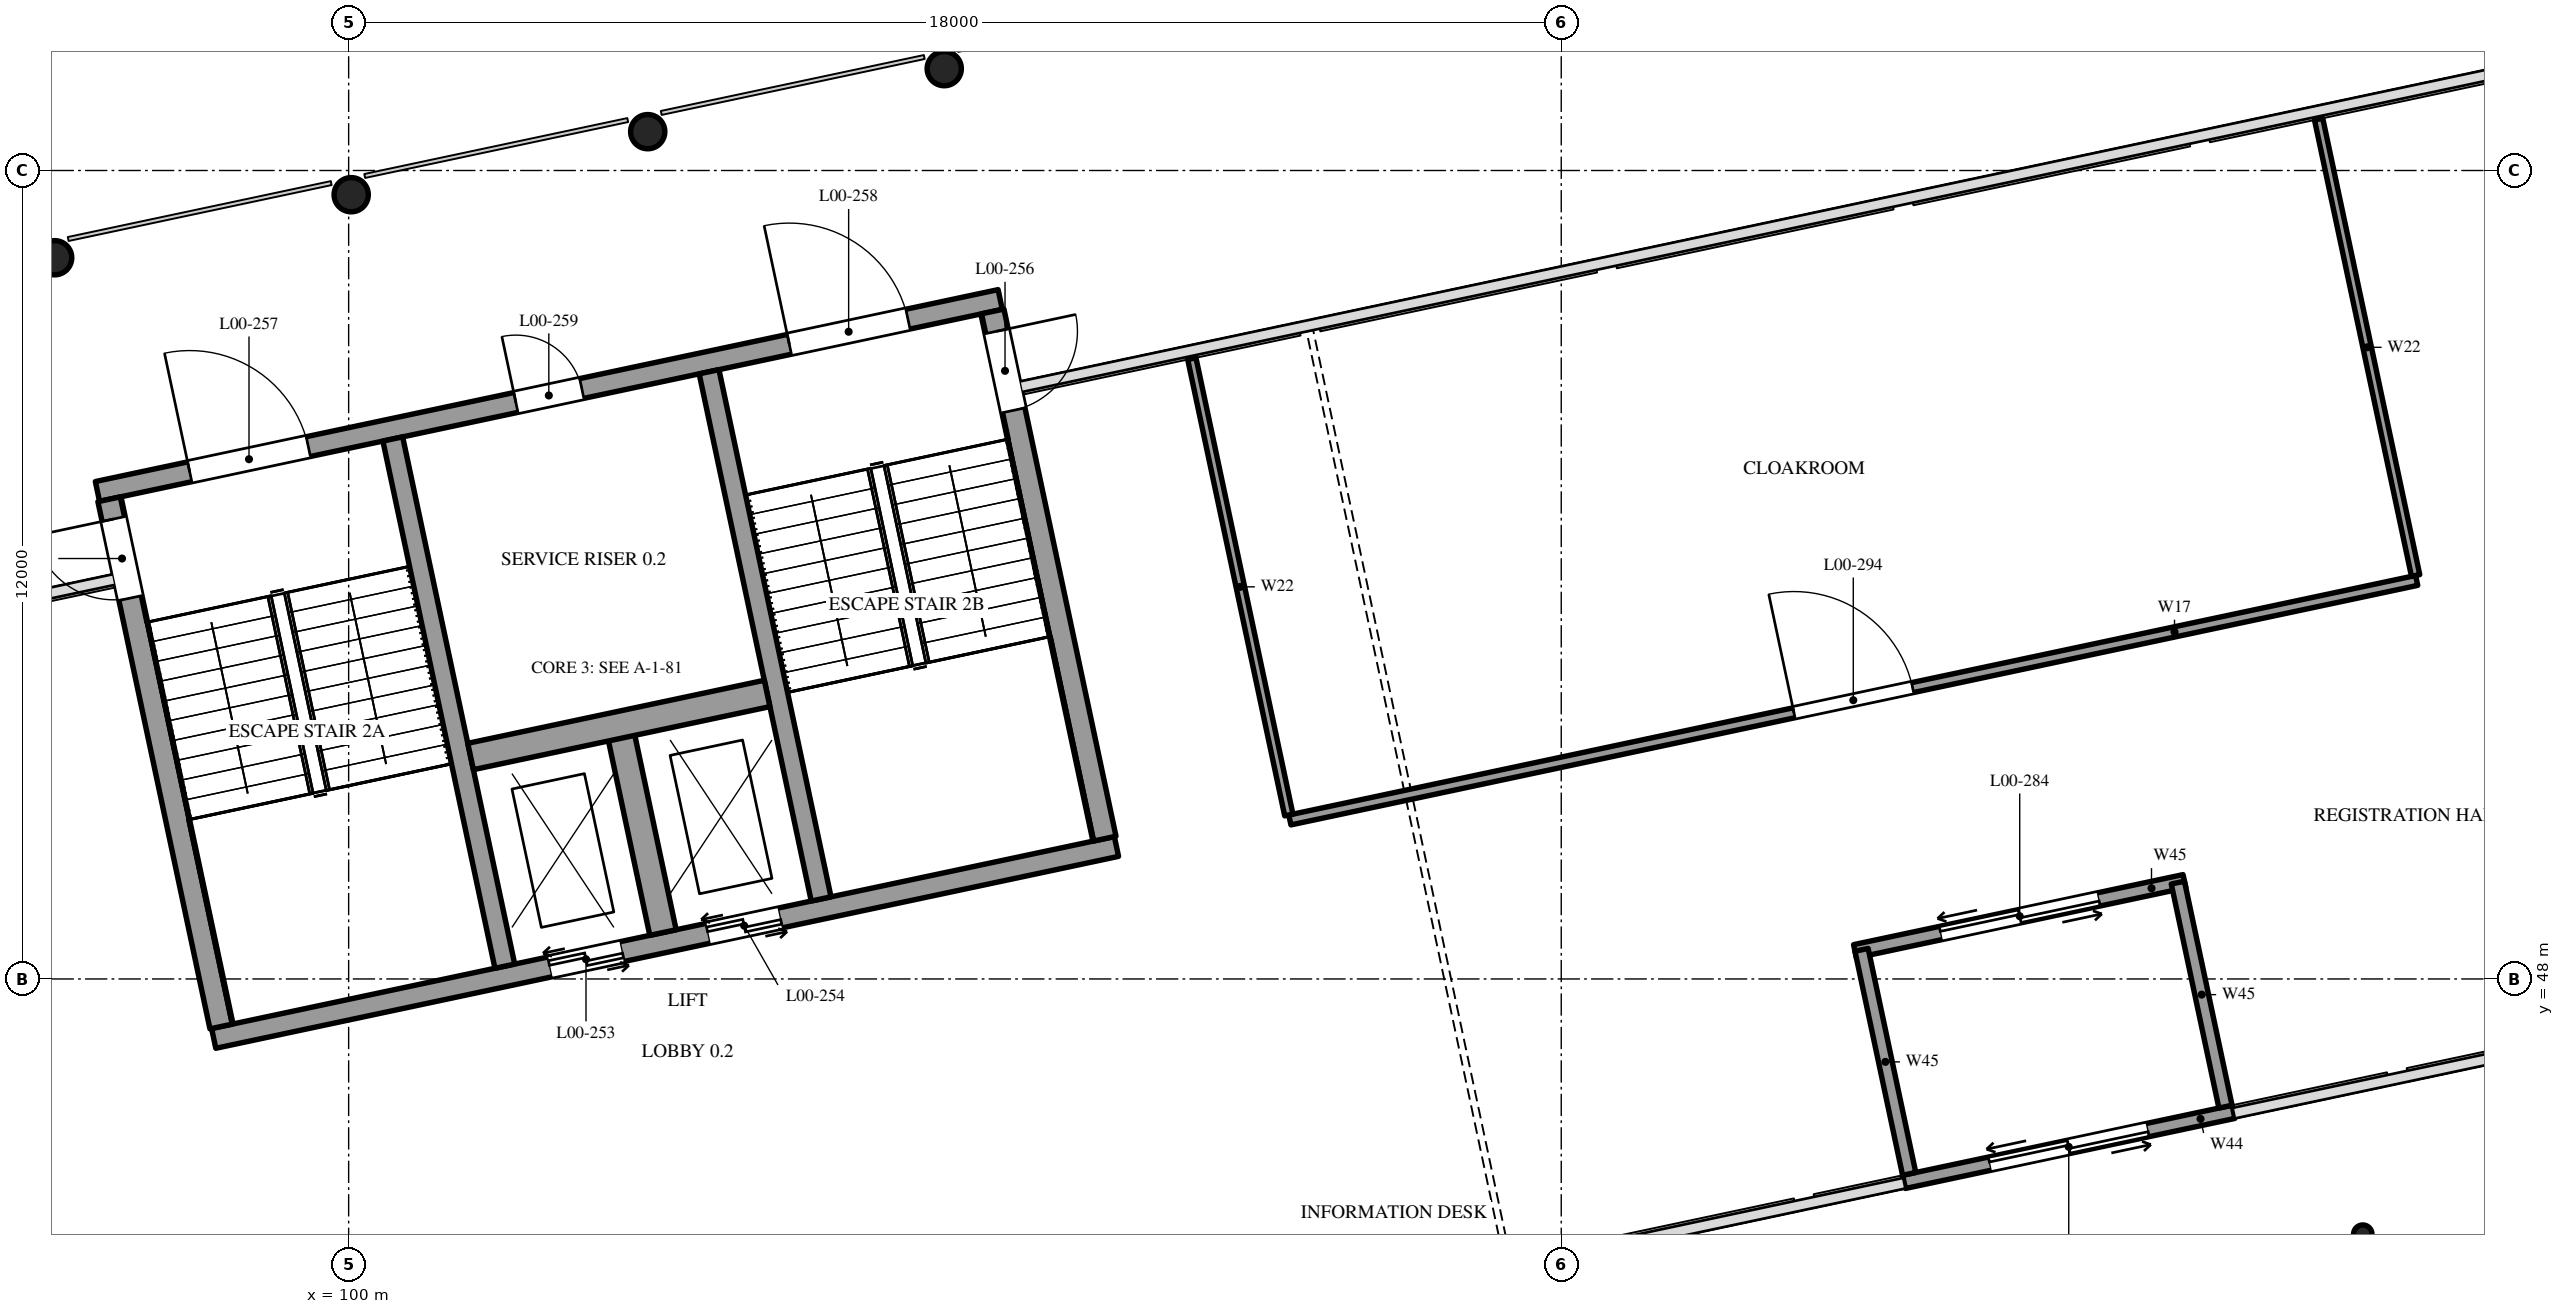
"""IFC4 building model, lengths in metres.
Left out: names, types, materials, properties, quantities, classifications, styles, units other than length and angle.
Written with IfcOpenShell. Run it as: python <this file> out.ifc"""

import sys

from ifc_helpers import new_model, si_unit, direction, frame, frame_2d, origin, origin_2d, place, context, subcontext, project, spatial, rectangle, hollow_circle, extrude, element, fill, save


model = new_model("IFC4")
c1 = context("Model", 3, precision=1e-05, world=origin(), true_north=direction((0.0, 1.0)))
c2 = subcontext(c1, "Body", "Model", "MODEL_VIEW")
j1 = project(units=[si_unit("LENGTHUNIT", "METRE"), si_unit("PLANEANGLEUNIT", "RADIAN")], contexts=[c1])
p1 = place(None, origin())
s1 = spatial("IfcSite", under=j1, at=p1, CompositionType="ELEMENT")
p2 = place(p1, origin())
s2 = spatial("IfcBuilding", under=s1, at=p2, CompositionType="ELEMENT")
p3 = place(p2, origin())
s3 = spatial("IfcBuildingStorey", under=s2, at=p3, CompositionType="ELEMENT", Elevation=0.0)
for number, where, z_axis, x_axis in (
    (1, (95.636, 58.705, -0.4), (0.0, 0.0, 1.0), (0.978, 0.208, 0.0)),
    (2, (100.038, 59.641, -0.4), (0.0, 0.0, 1.0), (0.978, 0.208, 0.0)),
    (3, (104.439, 60.576, -0.4), (0.0, 0.0, 1.0), (0.978, 0.208, 0.0)),
    (4, (108.841, 61.512, -0.4), (0.0, 0.0, 1.0), (0.978, 0.208, 0.0)),
):
    element("IfcColumn", number, at=place(p3, frame(where, z_axis=z_axis, x_axis=x_axis)), inside=s3, PredefinedType="COLUMN", context=c2, shape_type="SweptSolid", body=[
        extrude(hollow_circle(Radius=0.254, WallThickness=0.016, at=origin_2d()), origin(), (0.0, 0.0, 1.0), 7.6),
    ])
p4 = place(p3, frame((96.271, 55.236, -1.4), z_axis=(0.0, 0.0, 1.0), x_axis=(0.978147662755, 0.20791139903, 0.0)))
e5 = element("IfcWall", 5, at=p4, inside=s3, PredefinedType="SHEAR", context=c2, shape_type="SweptSolid", body=[
    extrude(rectangle(XDim=13.7, YDim=0.3, at=frame_2d((6.85, 0.0))), origin(), (0.0, 0.0, 1.0), 8.6),
])
p5 = place(p4, frame((1.4, 0.0, 1.4)))
e6 = element("IfcOpeningElement", 6, at=p5, cuts=e5, PredefinedType="OPENING", context=c2, shape_type="SweptSolid", body=[
    extrude(rectangle(XDim=1.8, YDim=2.1, at=frame_2d((0.9, 1.05))), frame((0.0, 0.16, 0.0), z_axis=(0.0, -1.0, 0.0), x_axis=(1.0, 0.0, 0.0)), (0.0, 0.0, 1.0), 0.32),
])
p6 = place(p4, frame((10.5, 0.0, 1.4)))
e7 = element("IfcOpeningElement", 7, at=p6, cuts=e5, PredefinedType="OPENING", context=c2, shape_type="SweptSolid", body=[
    extrude(rectangle(XDim=1.8, YDim=2.1, at=frame_2d((0.9, 1.05))), frame((0.0, 0.16, 0.0), z_axis=(0.0, -1.0, 0.0), x_axis=(1.0, 0.0, 0.0)), (0.0, 0.0, 1.0), 0.32),
])
p7 = place(p4, frame((6.35, 0.0, 1.4)))
e8 = element("IfcOpeningElement", 8, at=p7, cuts=e5, PredefinedType="OPENING", context=c2, shape_type="SweptSolid", body=[
    extrude(rectangle(XDim=1.0, YDim=2.1, at=frame_2d((0.5, 1.05))), frame((0.0, 0.16, 0.0), z_axis=(0.0, -1.0, 0.0), x_axis=(1.0, 0.0, 0.0)), (0.0, 0.0, 1.0), 0.32),
])
p8 = place(p3, frame((97.997, 47.118, -1.4), z_axis=(0.0, 0.0, 1.0), x_axis=(0.978147662755, 0.20791139903, 0.0)))
e9 = element("IfcWall", 9, at=p8, inside=s3, PredefinedType="SHEAR", context=c2, shape_type="SweptSolid", body=[
    extrude(rectangle(XDim=13.7, YDim=0.3, at=frame_2d((6.85, 0.0))), origin(), (0.0, 0.0, 1.0), 8.6),
])
p9 = place(p8, frame((5.1, 0.0, 1.4)))
e10 = element("IfcOpeningElement", 10, at=p9, cuts=e9, PredefinedType="OPENING", context=c2, shape_type="SweptSolid", body=[
    extrude(rectangle(XDim=1.1, YDim=2.1, at=frame_2d((0.55, 1.05))), frame((0.0, 0.16, 0.0), z_axis=(0.0, -1.0, 0.0), x_axis=(1.0, 0.0, 0.0)), (0.0, 0.0, 1.0), 0.32),
])
p10 = place(p8, frame((7.5, 0.0, 1.4)))
e11 = element("IfcOpeningElement", 11, at=p10, cuts=e9, PredefinedType="OPENING", context=c2, shape_type="SweptSolid", body=[
    extrude(rectangle(XDim=1.1, YDim=2.1, at=frame_2d((0.55, 1.05))), frame((0.0, 0.16, 0.0), z_axis=(0.0, -1.0, 0.0), x_axis=(1.0, 0.0, 0.0)), (0.0, 0.0, 1.0), 0.32),
])
p11 = place(p3, frame((96.449, 55.121, -1.4), z_axis=(0.0, 0.0, 1.0), x_axis=(0.207915693476, -0.978146749934, 0.0)))
e12 = element("IfcWall", 12, at=p11, inside=s3, PredefinedType="SOLIDWALL", context=c2, shape_type="SweptSolid", body=[
    extrude(rectangle(XDim=8.0, YDim=0.35, at=frame_2d((4.0, 0.0))), origin(), (0.0, 0.0, 1.0), 8.6),
])
p12 = place(p11, frame((0.3, 0.0, 1.4)))
e13 = element("IfcOpeningElement", 13, at=p12, cuts=e12, PredefinedType="OPENING", context=c2, shape_type="SweptSolid", body=[
    extrude(rectangle(XDim=1.2, YDim=2.1, at=frame_2d((0.6, 1.05))), frame((0.0, 0.185, 0.0), z_axis=(0.0, -1.0, 0.0), x_axis=(1.0, 0.0, 0.0)), (0.0, 0.0, 1.0), 0.37),
])
p13 = place(p3, frame((109.556, 57.907, -1.4), z_axis=(0.0, 0.0, 1.0), x_axis=(0.207915693476, -0.978146749934, 0.0)))
e14 = element("IfcWall", 14, at=p13, inside=s3, PredefinedType="SOLIDWALL", context=c2, shape_type="SweptSolid", body=[
    extrude(rectangle(XDim=8.0, YDim=0.35, at=frame_2d((4.0, 0.0))), origin(), (0.0, 0.0, 1.0), 8.6),
])
p14 = place(p13, frame((0.3, 0.0, 1.4)))
e15 = element("IfcOpeningElement", 15, at=p14, cuts=e14, PredefinedType="OPENING", context=c2, shape_type="SweptSolid", body=[
    extrude(rectangle(XDim=1.2, YDim=2.1, at=frame_2d((0.6, 1.05))), frame((0.0, 0.185, 0.0), z_axis=(0.0, -1.0, 0.0), x_axis=(1.0, 0.0, 0.0)), (0.0, 0.0, 1.0), 0.37),
])
for number, where, z_axis, x_axis in (
    (16, (100.655, 56.015, -1.4), (0.0, 0.0, 1.0), (0.208, -0.978, 0.0)),
    (17, (105.35, 57.013, -1.4), (0.0, 0.0, 1.0), (0.208, -0.978, 0.0)),
):
    element("IfcWall", number, at=place(p3, frame(where, z_axis=z_axis, x_axis=x_axis)), inside=s3, PredefinedType="SHEAR", context=c2, shape_type="SweptSolid", body=[
        extrude(rectangle(XDim=8.0, YDim=0.3, at=frame_2d((4.0, 0.0))), origin(), (0.0, 0.0, 1.0), 8.6),
    ])
p15 = place(p3, frame((104.042, 51.623, -1.4), z_axis=(0.0, 0.0, 1.0), x_axis=(0.207917150959, -0.978146440129, 0.0)))
e18 = element("IfcWall", 18, at=p15, inside=s3, PredefinedType="SHEAR", context=c2, shape_type="SweptSolid", body=[
    extrude(rectangle(XDim=3.0, YDim=0.4, at=frame_2d((1.5, 0.0))), origin(), (0.0, 0.0, 1.0), 8.6),
])
p16 = place(p3, frame((101.81, 51.302, -1.4), z_axis=(0.0, 0.0, 1.0), x_axis=(0.978138577198, 0.207954138688, 0.0)))
e19 = element("IfcWall", 19, at=p16, inside=s3, PredefinedType="SHEAR", context=c2, shape_type="SweptSolid", body=[
    extrude(rectangle(XDim=4.5, YDim=0.4, at=frame_2d((2.25, 0.0))), origin(), (0.0, 0.0, 1.0), 8.6),
])
p17 = place(p3, frame((123.088, 44.988, 0.0), z_axis=(0.0, 0.0, 1.0), x_axis=(0.978149046495, 0.207904888932, 0.0)))
e20 = element("IfcWall", 20, at=p17, inside=s3, PredefinedType="SOLIDWALL", context=c2, shape_type="SweptSolid", body=[
    extrude(rectangle(XDim=5.0, YDim=0.2, at=frame_2d((2.5, 0.0))), origin(), (0.0, 0.0, 1.0), 6.05),
])
p18 = place(p17, frame((1.3, 0.0, 0.0)))
e21 = element("IfcOpeningElement", 21, at=p18, cuts=e20, PredefinedType="OPENING", context=c2, shape_type="SweptSolid", body=[
    extrude(rectangle(XDim=2.4, YDim=2.4, at=frame_2d((1.2, 1.2))), frame((0.0, 0.11, 0.0), z_axis=(0.0, -1.0, 0.0), x_axis=(1.0, 0.0, 0.0)), (0.0, 0.0, 1.0), 0.22),
])
p19 = place(p3, frame((122.36, 48.412, 0.0), z_axis=(0.0, 0.0, 1.0), x_axis=(0.978146935828, 0.207914818928, 0.0)))
e22 = element("IfcWall", 22, at=p19, inside=s3, PredefinedType="SOLIDWALL", context=c2, shape_type="SweptSolid", body=[
    extrude(rectangle(XDim=5.0, YDim=0.2, at=frame_2d((2.5, 0.0))), origin(), (0.0, 0.0, 1.0), 6.05),
])
p20 = place(p19, frame((1.3, 0.0, 0.0)))
e23 = element("IfcOpeningElement", 23, at=p20, cuts=e22, PredefinedType="OPENING", context=c2, shape_type="SweptSolid", body=[
    extrude(rectangle(XDim=2.4, YDim=2.4, at=frame_2d((1.2, 1.2))), frame((0.0, 0.11, 0.0), z_axis=(0.0, -1.0, 0.0), x_axis=(1.0, 0.0, 0.0)), (0.0, 0.0, 1.0), 0.22),
])
for number, where, z_axis, x_axis in (
    (24, (123.165, 45.107, 0.0), (0.0, 0.0, 1.0), (-0.208, 0.978, 0.0)),
    (25, (127.86, 46.104, 0.0), (0.0, 0.0, 1.0), (-0.208, 0.978, 0.0)),
):
    element("IfcWall", number, at=place(p3, frame(where, z_axis=z_axis, x_axis=x_axis)), inside=s3, PredefinedType="SOLIDWALL", context=c2, shape_type="SweptSolid", body=[
        extrude(rectangle(XDim=3.4, YDim=0.2, at=frame_2d((1.7, 0.0))), origin(), (0.0, 0.0, 1.0), 6.05),
    ])
p21 = place(p3, frame((113.972, 50.36, 0.0), z_axis=(0.0, 0.0, 1.0), x_axis=(0.978148943882, 0.207905371704, 0.0)))
e26 = element("IfcWall", 26, at=p21, inside=s3, PredefinedType="PARTITIONING", context=c2, shape_type="SweptSolid", body=[
    extrude(rectangle(XDim=17.1, YDim=0.15, at=frame_2d((8.55, 0.0))), origin(), (0.0, 0.0, 1.0), 6.1),
])
p22 = place(p21, frame((7.65, 0.0, 0.0)))
e27 = element("IfcOpeningElement", 27, at=p22, cuts=e26, PredefinedType="OPENING", context=c2, shape_type="SweptSolid", body=[
    extrude(rectangle(XDim=1.8, YDim=2.1, at=frame_2d((0.9, 1.05))), frame((0.0, 0.085, 0.0), z_axis=(0.0, -1.0, 0.0), x_axis=(1.0, 0.0, 0.0)), (0.0, 0.0, 1.0), 0.17),
])
for number, where, z_axis, x_axis in (
    (28, (112.516, 57.207, 0.0), (0.0, 0.0, 1.0), (0.208, -0.978, 0.0)),
    (29, (129.243, 60.762, 0.0), (0.0, 0.0, 1.0), (0.208, -0.978, 0.0)),
):
    element("IfcWall", number, at=place(p3, frame(where, z_axis=z_axis, x_axis=x_axis)), inside=s3, PredefinedType="PARTITIONING", context=c2, shape_type="SweptSolid", body=[
        extrude(rectangle(XDim=6.925, YDim=0.125, at=frame_2d((3.462, 0.0))), origin(), (0.0, 0.0, 1.0), 6.1),
    ])
p23 = place(p3, frame((129.898, 44.212, -0.4), z_axis=(0.0, 0.0, 1.0), x_axis=(0.978147600734, 0.207911690818, 0.0)))
e30 = element("IfcColumn", 30, at=p23, inside=s3, PredefinedType="COLUMN", context=c2, shape_type="SweptSolid", body=[
    extrude(hollow_circle(Radius=0.136, WallThickness=0.012, at=origin_2d()), origin(), (0.0, 0.0, 1.0), 4.389),
])
p24 = place(p9, frame((1.1, 0.0, 0.0), z_axis=(0.0, 0.0, 1.0), x_axis=(-1.0, 0.0, 0.0)))
e31 = element("IfcDoor", 31, at=p24, inside=s3, OperationType="DOUBLE_DOOR_SLIDING", PredefinedType="DOOR", context=c2, shape_type="SweptSolid", body=[
    extrude(rectangle(XDim=1.1, YDim=2.1, at=frame_2d((0.55, 1.05))), frame((0.0, 0.025, 0.0), z_axis=(0.0, -1.0, 0.0), x_axis=(1.0, 0.0, 0.0)), (0.0, 0.0, 1.0), 0.05),
])
fill(e10, e31)
p25 = place(p10, frame((1.1, 0.0, 0.0), z_axis=(0.0, 0.0, 1.0), x_axis=(-1.0, 0.0, 0.0)))
e32 = element("IfcDoor", 32, at=p25, inside=s3, OperationType="DOUBLE_DOOR_SLIDING", PredefinedType="DOOR", context=c2, shape_type="SweptSolid", body=[
    extrude(rectangle(XDim=1.1, YDim=2.1, at=frame_2d((0.55, 1.05))), frame((0.0, 0.025, 0.0), z_axis=(0.0, -1.0, 0.0), x_axis=(1.0, 0.0, 0.0)), (0.0, 0.0, 1.0), 0.05),
])
fill(e11, e32)
p26 = place(p12, frame((1.2, 0.0, 0.0), z_axis=(0.0, 0.0, 1.0), x_axis=(-1.0, 0.0, 0.0)))
e33 = element("IfcDoor", 33, at=p26, inside=s3, OperationType="SINGLE_SWING_RIGHT", PredefinedType="DOOR", context=c2, shape_type="SweptSolid", body=[
    extrude(rectangle(XDim=1.2, YDim=2.1, at=frame_2d((0.6, 1.05))), frame((0.0, 0.025, 0.0), z_axis=(0.0, -1.0, 0.0), x_axis=(1.0, 0.0, 0.0)), (0.0, 0.0, 1.0), 0.05),
])
fill(e13, e33)
p27 = place(p14, origin())
e34 = element("IfcDoor", 34, at=p27, inside=s3, OperationType="SINGLE_SWING_RIGHT", PredefinedType="DOOR", context=c2, shape_type="SweptSolid", body=[
    extrude(rectangle(XDim=1.2, YDim=2.1, at=frame_2d((0.6, 1.05))), frame((0.0, 0.025, 0.0), z_axis=(0.0, -1.0, 0.0), x_axis=(1.0, 0.0, 0.0)), (0.0, 0.0, 1.0), 0.05),
])
fill(e15, e34)
p28 = place(p5, origin())
e35 = element("IfcDoor", 35, at=p28, inside=s3, OperationType="DOUBLE_DOOR_SINGLE_SWING", PredefinedType="DOOR", context=c2, shape_type="SweptSolid", body=[
    extrude(rectangle(XDim=1.8, YDim=2.1, at=frame_2d((0.9, 1.05))), frame((0.0, 0.025, 0.0), z_axis=(0.0, -1.0, 0.0), x_axis=(1.0, 0.0, 0.0)), (0.0, 0.0, 1.0), 0.05),
])
fill(e6, e35)
p29 = place(p6, origin())
e36 = element("IfcDoor", 36, at=p29, inside=s3, OperationType="DOUBLE_DOOR_SINGLE_SWING", PredefinedType="DOOR", context=c2, shape_type="SweptSolid", body=[
    extrude(rectangle(XDim=1.8, YDim=2.1, at=frame_2d((0.9, 1.05))), frame((0.0, 0.025, 0.0), z_axis=(0.0, -1.0, 0.0), x_axis=(1.0, 0.0, 0.0)), (0.0, 0.0, 1.0), 0.05),
])
fill(e7, e36)
p30 = place(p7, origin())
e37 = element("IfcDoor", 37, at=p30, inside=s3, OperationType="SINGLE_SWING_RIGHT", PredefinedType="DOOR", context=c2, shape_type="SweptSolid", body=[
    extrude(rectangle(XDim=1.0, YDim=2.1, at=frame_2d((0.5, 1.05))), frame((0.0, 0.025, 0.0), z_axis=(0.0, -1.0, 0.0), x_axis=(1.0, 0.0, 0.0)), (0.0, 0.0, 1.0), 0.05),
])
fill(e8, e37)
p31 = place(p18, frame((2.4, 0.0, 0.0), z_axis=(0.0, 0.0, 1.0), x_axis=(-1.0, 0.0, 0.0)))
e38 = element("IfcDoor", 38, at=p31, inside=s3, OperationType="DOUBLE_DOOR_SLIDING", PredefinedType="DOOR", context=c2, shape_type="SweptSolid", body=[
    extrude(rectangle(XDim=2.4, YDim=2.4, at=frame_2d((1.2, 1.2))), frame((0.0, 0.025, 0.0), z_axis=(0.0, -1.0, 0.0), x_axis=(1.0, 0.0, 0.0)), (0.0, 0.0, 1.0), 0.05),
])
fill(e21, e38)
p32 = place(p20, origin())
e39 = element("IfcDoor", 39, at=p32, inside=s3, OperationType="DOUBLE_DOOR_SLIDING", PredefinedType="DOOR", context=c2, shape_type="SweptSolid", body=[
    extrude(rectangle(XDim=2.4, YDim=2.4, at=frame_2d((1.2, 1.2))), frame((0.0, 0.025, 0.0), z_axis=(0.0, -1.0, 0.0), x_axis=(1.0, 0.0, 0.0)), (0.0, 0.0, 1.0), 0.05),
])
fill(e23, e39)
p33 = place(p22, origin())
e40 = element("IfcDoor", 40, at=p33, inside=s3, OperationType="DOUBLE_DOOR_SINGLE_SWING", PredefinedType="DOOR", context=c2, shape_type="SweptSolid", body=[
    extrude(rectangle(XDim=1.8, YDim=2.1, at=frame_2d((0.9, 1.05))), frame((0.0, 0.025, 0.0), z_axis=(0.0, -1.0, 0.0), x_axis=(1.0, 0.0, 0.0)), (0.0, 0.0, 1.0), 0.05),
])
fill(e27, e40)
save(model, sys.argv[1])
